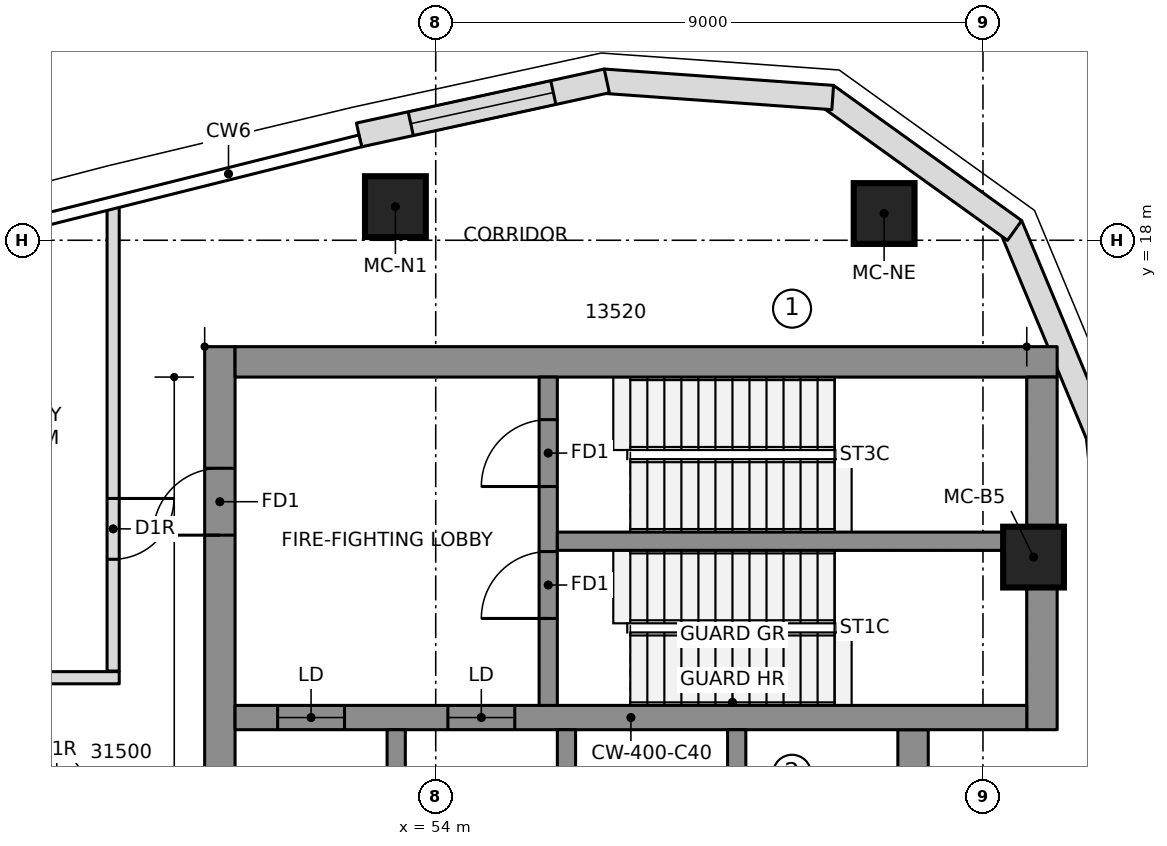
"""IFC4 building model, lengths in metres.
Left out: names, types, materials, properties, quantities, classifications, styles, units other than length and angle.
Written with IfcOpenShell. Run it as: python <this file> out.ifc"""

import sys

from ifc_helpers import new_model, si_unit, direction, frame, frame_2d, origin, origin_2d, place, context, subcontext, project, spatial, polyline, rectangle, outline, extrude, element, fill, save


model = new_model("IFC4")
c1 = context("Model", 3, precision=1e-05, world=origin(), true_north=direction((0.0, 1.0)))
c2 = subcontext(c1, "Body", "Model", "MODEL_VIEW")
j1 = project(units=[si_unit("LENGTHUNIT", "METRE"), si_unit("PLANEANGLEUNIT", "RADIAN")], contexts=[c1])
p1 = place(None, origin())
s1 = spatial("IfcSite", under=j1, at=p1, CompositionType="ELEMENT")
p2 = place(p1, origin())
s2 = spatial("IfcBuilding", under=s1, at=p2, CompositionType="ELEMENT")
p3 = place(p2, frame((0.0, 0.0, 308.6)))
s3 = spatial("IfcBuildingStorey", under=s2, at=p3, CompositionType="ELEMENT", Elevation=308.6)
p4 = place(p3, frame((50.45, 6.65, 0.0), z_axis=(0.0, 0.0, 1.0), x_axis=(0.0, 1.0, 0.0)))
e1 = element("IfcWall", 1, at=p4, inside=s3, PredefinedType="SHEAR", context=c2, shape_type="SweptSolid", body=[
    extrude(rectangle(XDim=9.6, YDim=0.5, at=frame_2d((4.8, 0.0))), origin(), (0.0, 0.0, 1.0), 4.6),
])
p5 = place(p4, frame((6.5, 0.0, 0.0)))
e2 = element("IfcOpeningElement", 2, at=p5, cuts=e1, PredefinedType="OPENING", context=c2, shape_type="SweptSolid", body=[
    extrude(rectangle(XDim=1.1, YDim=2.1, at=frame_2d((0.55, 1.05))), frame((0.0, 0.26, 0.0), z_axis=(0.0, -1.0, 0.0), x_axis=(1.0, 0.0, 0.0)), (0.0, 0.0, 1.0), 0.52),
])
p6 = place(p3, frame((50.7, 16.0, 0.0), z_axis=(0.0, 0.0, 1.0), x_axis=(1.0, 0.0, 0.0)))
e3 = element("IfcWall", 3, at=p6, inside=s3, PredefinedType="SHEAR", context=c2, shape_type="SweptSolid", body=[
    extrude(rectangle(XDim=13.52, YDim=0.5, at=frame_2d((6.76, 0.0))), origin(), (0.0, 0.0, 1.0), 4.6),
])
p7 = place(p3, frame((63.97, 9.95, 0.0), z_axis=(0.0, 0.0, 1.0), x_axis=(0.0, 1.0, 0.0)))
e4 = element("IfcWall", 4, at=p7, inside=s3, PredefinedType="SHEAR", context=c2, shape_type="SweptSolid", body=[
    extrude(rectangle(XDim=5.8, YDim=0.5, at=frame_2d((2.9, 0.0))), origin(), (0.0, 0.0, 1.0), 4.6),
])
p8 = place(p3, frame((61.85, -9.95, 0.0), z_axis=(0.0, 0.0, 1.0), x_axis=(0.0, 1.0, 0.0)))
e5 = element("IfcWall", 5, at=p8, inside=s3, PredefinedType="SHEAR", context=c2, shape_type="SweptSolid", body=[
    extrude(rectangle(XDim=19.9, YDim=0.5, at=frame_2d((9.95, 0.0))), origin(), (0.0, 0.0, 1.0), 4.6),
])
p9 = place(p3, frame((50.7, 10.15, 0.0), z_axis=(0.0, 0.0, 1.0), x_axis=(1.0, 0.0, 0.0)))
e6 = element("IfcWall", 6, at=p9, inside=s3, PredefinedType="SHEAR", context=c2, shape_type="SweptSolid", body=[
    extrude(rectangle(XDim=13.02, YDim=0.4, at=frame_2d((6.51, 0.0))), origin(), (0.0, 0.0, 1.0), 4.6),
])
p10 = place(p9, frame((0.7, 0.0, 0.0)))
e7 = element("IfcOpeningElement", 7, at=p10, cuts=e6, PredefinedType="OPENING", context=c2, shape_type="SweptSolid", body=[
    extrude(rectangle(XDim=1.1, YDim=2.1, at=frame_2d((0.55, 1.05))), frame((0.0, 0.21, 0.0), z_axis=(0.0, -1.0, 0.0), x_axis=(1.0, 0.0, 0.0)), (0.0, 0.0, 1.0), 0.42),
])
p11 = place(p9, frame((3.5, 0.0, 0.0)))
e8 = element("IfcOpeningElement", 8, at=p11, cuts=e6, PredefinedType="OPENING", context=c2, shape_type="SweptSolid", body=[
    extrude(rectangle(XDim=1.1, YDim=2.1, at=frame_2d((0.55, 1.05))), frame((0.0, 0.21, 0.0), z_axis=(0.0, -1.0, 0.0), x_axis=(1.0, 0.0, 0.0)), (0.0, 0.0, 1.0), 0.42),
])
for number, where, z_axis, x_axis in (
    (9, (53.35, 6.95, 0.0), (0.0, 0.0, 1.0), (0.0, 1.0, 0.0)),
    (10, (56.15, 6.95, 0.0), (0.0, 0.0, 1.0), (0.0, 1.0, 0.0)),
    (11, (58.95, 6.95, 0.0), (0.0, 0.0, 1.0), (0.0, 1.0, 0.0)),
):
    element("IfcWall", number, at=place(p3, frame(where, z_axis=z_axis, x_axis=x_axis)), inside=s3, PredefinedType="SHEAR", context=c2, shape_type="SweptSolid", body=[
        extrude(rectangle(XDim=3.0, YDim=0.3, at=frame_2d((1.5, 0.0))), origin(), (0.0, 0.0, 1.0), 4.6),
    ])
p12 = place(p3, frame((55.85, 10.35, 0.0), z_axis=(0.0, 0.0, 1.0), x_axis=(0.0, 1.0, 0.0)))
e12 = element("IfcWall", 12, at=p12, inside=s3, PredefinedType="SHEAR", context=c2, shape_type="SweptSolid", body=[
    extrude(rectangle(XDim=5.4, YDim=0.3, at=frame_2d((2.7, 0.0))), origin(), (0.0, 0.0, 1.0), 4.6),
])
p13 = place(p12, frame((1.43, 0.0, 0.0)))
e13 = element("IfcOpeningElement", 13, at=p13, cuts=e12, PredefinedType="OPENING", context=c2, shape_type="SweptSolid", body=[
    extrude(rectangle(XDim=1.1, YDim=2.1, at=frame_2d((0.55, 1.05))), frame((0.0, 0.16, 0.0), z_axis=(0.0, -1.0, 0.0), x_axis=(1.0, 0.0, 0.0)), (0.0, 0.0, 1.0), 0.32),
])
p14 = place(p12, frame((3.6, 0.0, 0.0)))
e14 = element("IfcOpeningElement", 14, at=p14, cuts=e12, PredefinedType="OPENING", context=c2, shape_type="SweptSolid", body=[
    extrude(rectangle(XDim=1.1, YDim=2.1, at=frame_2d((0.55, 1.05))), frame((0.0, 0.16, 0.0), z_axis=(0.0, -1.0, 0.0), x_axis=(1.0, 0.0, 0.0)), (0.0, 0.0, 1.0), 0.32),
])
p15 = place(p3, frame((56.0, 13.05, 0.0), z_axis=(0.0, 0.0, 1.0), x_axis=(1.0, 0.0, 0.0)))
e15 = element("IfcWall", 15, at=p15, inside=s3, PredefinedType="SHEAR", context=c2, shape_type="SweptSolid", body=[
    extrude(rectangle(XDim=7.72, YDim=0.3, at=frame_2d((3.86, 0.0))), origin(), (0.0, 0.0, 1.0), 4.6),
])
for number, where, z_axis, x_axis in (
    (16, (63.832, 12.789, 0.0), (0.0, 0.0, 1.0), (1.0, 0.0, 0.0)),
    (17, (61.374, 18.44, 0.0), (0.0, 0.0, 1.0), (1.0, 0.0, 0.0)),
    (18, (53.337, 18.553, 0.0), (0.0, 0.0, 1.0), (1.0, 0.0, 0.0)),
):
    element("IfcColumn", number, at=place(p3, frame(where, z_axis=z_axis, x_axis=x_axis)), inside=s3, PredefinedType="COLUMN", context=c2, shape_type="SweptSolid", body=[
        extrude(rectangle(XDim=1.0, YDim=1.0, at=origin_2d()), origin(), (0.0, 0.0, 1.0), 4.6),
    ])
p16 = place(p3, frame((65.331, 10.571, 0.0), z_axis=(0.0, 0.0, 1.0), x_axis=(-0.102249826987, 0.994758751096, 0.0)))
e19 = element("IfcWall", 19, at=p16, inside=s3, PredefinedType="NOTDEFINED", context=c2, shape_type="SweptSolid", body=[
    extrude(outline(polyline([(-0.003, -0.2), (4.263, -0.2), (4.204, 0.2), (0.003, 0.2), (-0.003, -0.2)])), origin(), (0.0, 0.0, 1.0), 4.3),
])
p17 = place(p16, frame((0.417, 0.0, 0.3)))
e20 = element("IfcOpeningElement", 20, at=p17, cuts=e19, PredefinedType="OPENING", context=c2, shape_type="SweptSolid", body=[
    extrude(rectangle(XDim=2.4, YDim=3.0, at=frame_2d((1.2, 1.5))), frame((0.0, 0.21, 0.0), z_axis=(0.0, -1.0, 0.0), x_axis=(1.0, 0.0, 0.0)), (0.0, 0.0, 1.0), 0.42),
])
p18 = place(p3, frame((64.898, 14.782, 0.0), z_axis=(0.0, 0.0, 1.0), x_axis=(-0.385285857918, 0.922797273343, 0.0)))
e21 = element("IfcWall", 21, at=p18, inside=s3, PredefinedType="NOTDEFINED", context=c2, shape_type="SweptSolid", body=[
    extrude(outline(polyline([(-0.03, -0.2), (3.753, -0.2), (3.64, 0.2), (0.03, 0.2), (-0.03, -0.2)])), origin(), (0.0, 0.0, 1.0), 4.3),
])
p19 = place(p3, frame((63.474, 18.194, 0.0), z_axis=(0.0, 0.0, 1.0), x_axis=(-0.811962548682, 0.583709533533, 0.0)))
e22 = element("IfcWall", 22, at=p19, inside=s3, PredefinedType="NOTDEFINED", context=c2, shape_type="SweptSolid", body=[
    extrude(outline(polyline([(-0.057, -0.2), (3.753, -0.2), (3.64, 0.2), (0.057, 0.2), (-0.057, -0.2)])), origin(), (0.0, 0.0, 1.0), 4.3),
])
p20 = place(p3, frame((60.472, 20.352, 0.0), z_axis=(0.0, 0.0, 1.0), x_axis=(-0.99746272096, 0.071190731806, 0.0)))
e23 = element("IfcWall", 23, at=p20, inside=s3, PredefinedType="NOTDEFINED", context=c2, shape_type="SweptSolid", body=[
    extrude(outline(polyline([(-0.057, -0.2), (3.726, -0.2), (3.668, 0.2), (0.057, 0.2), (-0.057, -0.2)])), origin(), (0.0, 0.0, 1.0), 4.3),
])
p21 = place(p3, frame((56.785, 20.615, 0.0), z_axis=(0.0, 0.0, 1.0), x_axis=(-0.977020225348, -0.213146614471, 0.0)))
e24 = element("IfcWall", 24, at=p21, inside=s3, PredefinedType="NOTDEFINED", context=c2, shape_type="SweptSolid", body=[
    extrude(outline(polyline([(-0.029, -0.2), (4.142, -0.2), (4.142, 0.2), (0.029, 0.2), (-0.029, -0.2)])), origin(), (0.0, 0.0, 1.0), 4.3),
])
p22 = place(p21, frame((0.871, 0.0, 0.3)))
e25 = element("IfcOpeningElement", 25, at=p22, cuts=e24, PredefinedType="OPENING", context=c2, shape_type="SweptSolid", body=[
    extrude(rectangle(XDim=2.4, YDim=3.0, at=frame_2d((1.2, 1.5))), frame((0.0, 0.21, 0.0), z_axis=(0.0, -1.0, 0.0), x_axis=(1.0, 0.0, 0.0)), (0.0, 0.0, 1.0), 0.42),
])
p23 = place(p3, frame((48.795, 10.805, 0.0), z_axis=(0.0, 0.0, 1.0), x_axis=(-0.999999999048, -4.3628114e-05, 0.0)))
e26 = element("IfcWall", 26, at=p23, inside=s3, PredefinedType="PARTITIONING", context=c2, shape_type="SweptSolid", body=[
    extrude(rectangle(XDim=5.596, YDim=0.2, at=frame_2d((2.798, 0.0))), origin(), (0.0, 0.0, 1.0), 4.3),
])
p24 = place(p23, frame((3.295, 0.0, 0.0)))
e27 = element("IfcOpeningElement", 27, at=p24, cuts=e26, PredefinedType="OPENING", context=c2, shape_type="SweptSolid", body=[
    extrude(rectangle(XDim=1.0, YDim=2.1, at=frame_2d((0.5, 1.05))), frame((0.0, 0.11, 0.0), z_axis=(0.0, -1.0, 0.0), x_axis=(1.0, 0.0, 0.0)), (0.0, 0.0, 1.0), 0.22),
])
p25 = place(p3, frame((48.695, 18.589, 0.0), z_axis=(0.0, 0.0, 1.0), x_axis=(0.0, -1.0, 0.0)))
e28 = element("IfcWall", 28, at=p25, inside=s3, PredefinedType="PARTITIONING", context=c2, shape_type="SweptSolid", body=[
    extrude(rectangle(XDim=7.674, YDim=0.2, at=frame_2d((3.837, 0.0))), origin(), (0.0, 0.0, 1.0), 4.3),
])
p26 = place(p25, frame((4.836, 0.0, 0.0)))
e29 = element("IfcOpeningElement", 29, at=p26, cuts=e28, PredefinedType="OPENING", context=c2, shape_type="SweptSolid", body=[
    extrude(rectangle(XDim=1.0, YDim=2.1, at=frame_2d((0.5, 1.05))), frame((0.0, 0.11, 0.0), z_axis=(0.0, -1.0, 0.0), x_axis=(1.0, 0.0, 0.0)), (0.0, 0.0, 1.0), 0.22),
])
p27 = place(p22, origin())
e30 = element("IfcWindow", 30, at=p27, inside=s3, PartitioningType="SINGLE_PANEL", PredefinedType="WINDOW", context=c2, shape_type="SweptSolid", body=[
    extrude(rectangle(XDim=2.4, YDim=3.0, at=frame_2d((1.2, 1.5))), frame((0.0, 0.17, 0.0), z_axis=(0.0, -1.0, 0.0), x_axis=(1.0, 0.0, 0.0)), (0.0, 0.0, 1.0), 0.06),
])
fill(e25, e30)
p28 = place(p26, origin())
e31 = element("IfcDoor", 31, at=p28, inside=s3, OperationType="SINGLE_SWING_RIGHT", PredefinedType="DOOR", context=c2, shape_type="SweptSolid", body=[
    extrude(rectangle(XDim=1.0, YDim=2.1, at=frame_2d((0.5, 1.05))), frame((0.0, 0.025, 0.0), z_axis=(0.0, -1.0, 0.0), x_axis=(1.0, 0.0, 0.0)), (0.0, 0.0, 1.0), 0.05),
])
fill(e29, e31)
p29 = place(p10, origin())
e32 = element("IfcDoor", 32, at=p29, inside=s3, OperationType="DOUBLE_DOOR_SLIDING", PredefinedType="DOOR", context=c2, shape_type="SweptSolid", body=[
    extrude(rectangle(XDim=1.1, YDim=2.1, at=frame_2d((0.55, 1.05))), frame((0.0, 0.025, 0.0), z_axis=(0.0, -1.0, 0.0), x_axis=(1.0, 0.0, 0.0)), (0.0, 0.0, 1.0), 0.05),
])
fill(e7, e32)
p30 = place(p11, origin())
e33 = element("IfcDoor", 33, at=p30, inside=s3, OperationType="DOUBLE_DOOR_SLIDING", PredefinedType="DOOR", context=c2, shape_type="SweptSolid", body=[
    extrude(rectangle(XDim=1.1, YDim=2.1, at=frame_2d((0.55, 1.05))), frame((0.0, 0.025, 0.0), z_axis=(0.0, -1.0, 0.0), x_axis=(1.0, 0.0, 0.0)), (0.0, 0.0, 1.0), 0.05),
])
fill(e8, e33)
p31 = place(p13, origin())
e34 = element("IfcDoor", 34, at=p31, inside=s3, OperationType="SINGLE_SWING_RIGHT", PredefinedType="DOOR", context=c2, shape_type="SweptSolid", body=[
    extrude(rectangle(XDim=1.1, YDim=2.1, at=frame_2d((0.55, 1.05))), frame((0.0, 0.025, 0.0), z_axis=(0.0, -1.0, 0.0), x_axis=(1.0, 0.0, 0.0)), (0.0, 0.0, 1.0), 0.05),
])
fill(e13, e34)
p32 = place(p14, origin())
e35 = element("IfcDoor", 35, at=p32, inside=s3, OperationType="SINGLE_SWING_RIGHT", PredefinedType="DOOR", context=c2, shape_type="SweptSolid", body=[
    extrude(rectangle(XDim=1.1, YDim=2.1, at=frame_2d((0.55, 1.05))), frame((0.0, 0.025, 0.0), z_axis=(0.0, -1.0, 0.0), x_axis=(1.0, 0.0, 0.0)), (0.0, 0.0, 1.0), 0.05),
])
fill(e14, e35)
p33 = place(p5, origin())
e36 = element("IfcDoor", 36, at=p33, inside=s3, OperationType="SINGLE_SWING_RIGHT", PredefinedType="DOOR", context=c2, shape_type="SweptSolid", body=[
    extrude(rectangle(XDim=1.1, YDim=2.1, at=frame_2d((0.55, 1.05))), frame((0.0, 0.025, 0.0), z_axis=(0.0, -1.0, 0.0), x_axis=(1.0, 0.0, 0.0)), (0.0, 0.0, 1.0), 0.05),
])
fill(e2, e36)
save(model, sys.argv[1])
